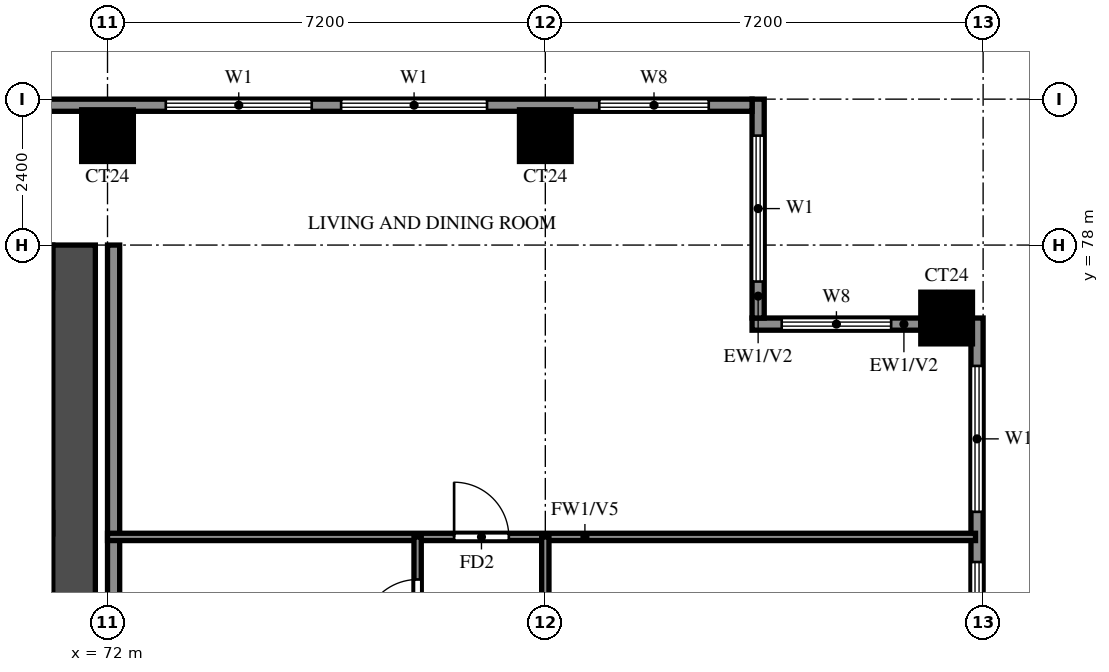
"""IFC4 building model, lengths in metres.
Left out: names, types, materials, properties, quantities, classifications, styles, units other than length and angle.
Written with IfcOpenShell. Run it as: python <this file> out.ifc"""

import sys

from ifc_helpers import new_model, si_unit, direction, frame, frame_2d, origin, origin_2d, place, context, subcontext, project, spatial, rectangle, extrude, source, transform, mapped, element, fill, save


model = new_model("IFC4")
c1 = context("Model", 3, precision=1e-05, world=origin(), true_north=direction((0.0, 1.0)))
c2 = subcontext(c1, "Body", "Model", "MODEL_VIEW")
j1 = project(units=[si_unit("LENGTHUNIT", "METRE"), si_unit("PLANEANGLEUNIT", "RADIAN")], contexts=[c1])
p1 = place(None, origin())
s1 = spatial("IfcSite", under=j1, at=p1, CompositionType="ELEMENT")
p2 = place(p1, origin())
s2 = spatial("IfcBuilding", under=s1, at=p2, CompositionType="ELEMENT")
p3 = place(p2, frame((0.0, 0.0, 150.0)))
s3 = spatial("IfcBuildingStorey", under=s2, at=p3, CompositionType="ELEMENT", Elevation=150.0)
m1 = source(origin(), c2, "Body", "SweptSolid", [
    extrude(rectangle(XDim=0.85, YDim=0.85, at=origin_2d()), origin(), (0.0, 0.0, 1.0), 3.2),
])
for number, where, z_axis, x_axis in (
    (1, (85.8, 76.8, 0.0), (0.0, 0.0, 1.0), (1.0, 0.0, 0.0)),
    (2, (72.0, 79.8, 0.0), (0.0, 0.0, 1.0), (1.0, 0.0, 0.0)),
    (3, (79.2, 79.8, 0.0), (0.0, 0.0, 1.0), (1.0, 0.0, 0.0)),
):
    element("IfcColumn", number, at=place(p3, frame(where, z_axis=z_axis, x_axis=x_axis)), inside=s3, PredefinedType="COLUMN", context=c2, shape_type="MappedRepresentation", body=[
        mapped(m1, transform((0.0, 0.0, 0.0))),
    ])
p4 = place(p3, frame((71.45, 66.1, 0.0), z_axis=(0.0, 0.0, 1.0), x_axis=(0.0, 1.0, 0.0)))
e4 = element("IfcWall", 4, at=p4, inside=s3, PredefinedType="SHEAR", context=c2, shape_type="SweptSolid", body=[
    extrude(rectangle(XDim=11.9, YDim=0.7, at=frame_2d((5.95, 0.0))), origin(), (0.0, 0.0, 1.0), 3.2),
])
p5 = place(p3, frame((29.7, 77.65, 0.0), z_axis=(0.0, 0.0, 1.0), x_axis=(1.0, 0.0, 0.0)))
e5 = element("IfcWall", 5, at=p5, inside=s3, PredefinedType="SHEAR", context=c2, shape_type="SweptSolid", body=[
    extrude(rectangle(XDim=41.4, YDim=0.7, at=frame_2d((20.7, 0.0))), origin(), (0.0, 0.0, 1.0), 3.2),
])
p6 = place(p3, frame((86.3, 48.2, 0.0), z_axis=(0.0, 0.0, 1.0), x_axis=(0.0, 1.0, 0.0)))
e6 = element("IfcWall", 6, at=p6, inside=s3, PredefinedType="SOLIDWALL", context=c2, shape_type="SweptSolid", body=[
    extrude(rectangle(XDim=28.6, YDim=0.2, at=frame_2d((14.3, 0.0))), origin(), (0.0, 0.0, 1.0), 3.2),
])
p7 = place(p6, frame((11.5, 0.0, 0.0)))
e7 = element("IfcOpeningElement", 7, at=p7, cuts=e6, PredefinedType="OPENING", context=c2, shape_type="SweptSolid", body=[
    extrude(rectangle(XDim=1.8, YDim=2.4, at=frame_2d((0.9, 1.2))), frame((0.0, 0.11, 0.0), z_axis=(0.0, -1.0, 0.0), x_axis=(1.0, 0.0, 0.0)), (0.0, 0.0, 1.0), 0.22),
])
p8 = place(p6, frame((0.6, 0.0, 0.6)))
e8 = element("IfcOpeningElement", 8, at=p8, cuts=e6, PredefinedType="OPENING", context=c2, shape_type="SweptSolid", body=[
    extrude(rectangle(XDim=2.4, YDim=2.4, at=frame_2d((1.2, 1.2))), frame((0.0, 0.11, 0.0), z_axis=(0.0, -1.0, 0.0), x_axis=(1.0, 0.0, 0.0)), (0.0, 0.0, 1.0), 0.22),
])
p9 = place(p6, frame((3.812, 0.0, 0.6)))
e9 = element("IfcOpeningElement", 9, at=p9, cuts=e6, PredefinedType="OPENING", context=c2, shape_type="SweptSolid", body=[
    extrude(rectangle(XDim=2.4, YDim=2.4, at=frame_2d((1.2, 1.2))), frame((0.0, 0.11, 0.0), z_axis=(0.0, -1.0, 0.0), x_axis=(1.0, 0.0, 0.0)), (0.0, 0.0, 1.0), 0.22),
])
p10 = place(p6, frame((7.488, 0.0, 0.6)))
e10 = element("IfcOpeningElement", 10, at=p10, cuts=e6, PredefinedType="OPENING", context=c2, shape_type="SweptSolid", body=[
    extrude(rectangle(XDim=1.8, YDim=2.4, at=frame_2d((0.9, 1.2))), frame((0.0, 0.11, 0.0), z_axis=(0.0, -1.0, 0.0), x_axis=(1.0, 0.0, 0.0)), (0.0, 0.0, 1.0), 0.22),
])
p11 = place(p6, frame((14.837, 0.0, 1.5)))
e11 = element("IfcOpeningElement", 11, at=p11, cuts=e6, PredefinedType="OPENING", context=c2, shape_type="SweptSolid", body=[
    extrude(rectangle(XDim=0.9, YDim=0.9, at=frame_2d((0.45, 0.45))), frame((0.0, 0.11, 0.0), z_axis=(0.0, -1.0, 0.0), x_axis=(1.0, 0.0, 0.0)), (0.0, 0.0, 1.0), 0.22),
])
p12 = place(p6, frame((16.75, 0.0, 1.5)))
e12 = element("IfcOpeningElement", 12, at=p12, cuts=e6, PredefinedType="OPENING", context=c2, shape_type="SweptSolid", body=[
    extrude(rectangle(XDim=0.9, YDim=0.9, at=frame_2d((0.45, 0.45))), frame((0.0, 0.11, 0.0), z_axis=(0.0, -1.0, 0.0), x_axis=(1.0, 0.0, 0.0)), (0.0, 0.0, 1.0), 0.22),
])
p13 = place(p6, frame((18.212, 0.0, 0.6)))
e13 = element("IfcOpeningElement", 13, at=p13, cuts=e6, PredefinedType="OPENING", context=c2, shape_type="SweptSolid", body=[
    extrude(rectangle(XDim=2.4, YDim=2.4, at=frame_2d((1.2, 1.2))), frame((0.0, 0.11, 0.0), z_axis=(0.0, -1.0, 0.0), x_axis=(1.0, 0.0, 0.0)), (0.0, 0.0, 1.0), 0.22),
])
p14 = place(p6, frame((22.188, 0.0, 0.6)))
e14 = element("IfcOpeningElement", 14, at=p14, cuts=e6, PredefinedType="OPENING", context=c2, shape_type="SweptSolid", body=[
    extrude(rectangle(XDim=2.4, YDim=2.4, at=frame_2d((1.2, 1.2))), frame((0.0, 0.11, 0.0), z_axis=(0.0, -1.0, 0.0), x_axis=(1.0, 0.0, 0.0)), (0.0, 0.0, 1.0), 0.22),
])
p15 = place(p6, frame((25.413, 0.0, 0.6)))
e15 = element("IfcOpeningElement", 15, at=p15, cuts=e6, PredefinedType="OPENING", context=c2, shape_type="SweptSolid", body=[
    extrude(rectangle(XDim=2.4, YDim=2.4, at=frame_2d((1.2, 1.2))), frame((0.0, 0.11, 0.0), z_axis=(0.0, -1.0, 0.0), x_axis=(1.0, 0.0, 0.0)), (0.0, 0.0, 1.0), 0.22),
])
p16 = place(p3, frame((85.375, 76.7, 0.0), z_axis=(0.0, 0.0, 1.0), x_axis=(-1.0, 0.0, 0.0)))
e16 = element("IfcWall", 16, at=p16, inside=s3, PredefinedType="SOLIDWALL", context=c2, shape_type="SweptSolid", body=[
    extrude(rectangle(XDim=2.775, YDim=0.2, at=frame_2d((1.387, 0.0))), origin(), (0.0, 0.0, 1.0), 3.2),
])
p17 = place(p16, frame((0.488, 0.0, 0.6)))
e17 = element("IfcOpeningElement", 17, at=p17, cuts=e16, PredefinedType="OPENING", context=c2, shape_type="SweptSolid", body=[
    extrude(rectangle(XDim=1.8, YDim=2.4, at=frame_2d((0.9, 1.2))), frame((0.0, 0.11, 0.0), z_axis=(0.0, -1.0, 0.0), x_axis=(1.0, 0.0, 0.0)), (0.0, 0.0, 1.0), 0.22),
])
p18 = place(p3, frame((82.7, 76.8, 0.0), z_axis=(0.0, 0.0, 1.0), x_axis=(0.0, 1.0, 0.0)))
e18 = element("IfcWall", 18, at=p18, inside=s3, PredefinedType="SOLIDWALL", context=c2, shape_type="SweptSolid", body=[
    extrude(rectangle(XDim=3.6, YDim=0.2, at=frame_2d((1.8, 0.0))), origin(), (0.0, 0.0, 1.0), 3.2),
])
p19 = place(p18, frame((0.6, 0.0, 0.6)))
e19 = element("IfcOpeningElement", 19, at=p19, cuts=e18, PredefinedType="OPENING", context=c2, shape_type="SweptSolid", body=[
    extrude(rectangle(XDim=2.4, YDim=2.4, at=frame_2d((1.2, 1.2))), frame((0.0, 0.11, 0.0), z_axis=(0.0, -1.0, 0.0), x_axis=(1.0, 0.0, 0.0)), (0.0, 0.0, 1.0), 0.22),
])
p20 = place(p3, frame((82.6, 80.3, 0.0), z_axis=(0.0, 0.0, 1.0), x_axis=(-1.0, 0.0, 0.0)))
e20 = element("IfcWall", 20, at=p20, inside=s3, PredefinedType="SOLIDWALL", context=c2, shape_type="SweptSolid", body=[
    extrude(rectangle(XDim=53.8, YDim=0.2, at=frame_2d((26.9, 0.0))), origin(), (0.0, 0.0, 1.0), 3.2),
])
p21 = place(p20, frame((0.712, 0.0, 0.6)))
e21 = element("IfcOpeningElement", 21, at=p21, cuts=e20, PredefinedType="OPENING", context=c2, shape_type="SweptSolid", body=[
    extrude(rectangle(XDim=1.8, YDim=2.4, at=frame_2d((0.9, 1.2))), frame((0.0, 0.11, 0.0), z_axis=(0.0, -1.0, 0.0), x_axis=(1.0, 0.0, 0.0)), (0.0, 0.0, 1.0), 0.22),
])
p22 = place(p20, frame((4.358, 0.0, 0.6)))
e22 = element("IfcOpeningElement", 22, at=p22, cuts=e20, PredefinedType="OPENING", context=c2, shape_type="SweptSolid", body=[
    extrude(rectangle(XDim=2.4, YDim=2.4, at=frame_2d((1.2, 1.2))), frame((0.0, 0.11, 0.0), z_axis=(0.0, -1.0, 0.0), x_axis=(1.0, 0.0, 0.0)), (0.0, 0.0, 1.0), 0.22),
])
p23 = place(p20, frame((7.242, 0.0, 0.6)))
e23 = element("IfcOpeningElement", 23, at=p23, cuts=e20, PredefinedType="OPENING", context=c2, shape_type="SweptSolid", body=[
    extrude(rectangle(XDim=2.4, YDim=2.4, at=frame_2d((1.2, 1.2))), frame((0.0, 0.11, 0.0), z_axis=(0.0, -1.0, 0.0), x_axis=(1.0, 0.0, 0.0)), (0.0, 0.0, 1.0), 0.22),
])
p24 = place(p3, frame((72.1, 62.4, 0.0), z_axis=(0.0, 0.0, 1.0), x_axis=(0.0, 1.0, 0.0)))
e24 = element("IfcWall", 24, at=p24, inside=s3, PredefinedType="SOLIDWALL", context=c2, shape_type="SweptSolid", body=[
    extrude(rectangle(XDim=15.6, YDim=0.2, at=frame_2d((7.8, 0.0))), origin(), (0.0, 0.0, 1.0), 3.2),
])
p25 = place(p3, frame((72.0, 73.2, 0.0), z_axis=(0.0, 0.0, 1.0), x_axis=(1.0, 0.0, 0.0)))
e25 = element("IfcWall", 25, at=p25, inside=s3, PredefinedType="PARTITIONING", context=c2, shape_type="SweptSolid", body=[
    extrude(rectangle(XDim=14.275, YDim=0.12, at=frame_2d((7.137, 0.0))), origin(), (0.0, 0.0, 1.0), 2.3),
])
p26 = place(p25, frame((5.7, 0.0, 0.0)))
e26 = element("IfcOpeningElement", 26, at=p26, cuts=e25, PredefinedType="OPENING", context=c2, shape_type="SweptSolid", body=[
    extrude(rectangle(XDim=0.9, YDim=2.1, at=frame_2d((0.45, 1.05))), frame((0.0, 0.07, 0.0), z_axis=(0.0, -1.0, 0.0), x_axis=(1.0, 0.0, 0.0)), (0.0, 0.0, 1.0), 0.14),
])
p27 = place(p3, frame((77.1, 61.2, 0.0), z_axis=(0.0, 0.0, 1.0), x_axis=(0.0, 1.0, 0.0)))
e27 = element("IfcWall", 27, at=p27, inside=s3, PredefinedType="PARTITIONING", context=c2, shape_type="SweptSolid", body=[
    extrude(rectangle(XDim=12.0, YDim=0.12, at=frame_2d((6.0, 0.0))), origin(), (0.0, 0.0, 1.0), 3.2),
])
p28 = place(p27, frame((5.45, 0.0, 0.0)))
e28 = element("IfcOpeningElement", 28, at=p28, cuts=e27, PredefinedType="OPENING", context=c2, shape_type="SweptSolid", body=[
    extrude(rectangle(XDim=0.8, YDim=2.1, at=frame_2d((0.4, 1.05))), frame((0.0, 0.07, 0.0), z_axis=(0.0, -1.0, 0.0), x_axis=(1.0, 0.0, 0.0)), (0.0, 0.0, 1.0), 0.14),
])
p29 = place(p27, frame((7.975, 0.0, 0.0)))
e29 = element("IfcOpeningElement", 29, at=p29, cuts=e27, PredefinedType="OPENING", context=c2, shape_type="SweptSolid", body=[
    extrude(rectangle(XDim=0.8, YDim=2.1, at=frame_2d((0.4, 1.05))), frame((0.0, 0.07, 0.0), z_axis=(0.0, -1.0, 0.0), x_axis=(1.0, 0.0, 0.0)), (0.0, 0.0, 1.0), 0.14),
])
p30 = place(p27, frame((10.4, 0.0, 0.0)))
e30 = element("IfcOpeningElement", 30, at=p30, cuts=e27, PredefinedType="OPENING", context=c2, shape_type="SweptSolid", body=[
    extrude(rectangle(XDim=0.9, YDim=2.1, at=frame_2d((0.45, 1.05))), frame((0.0, 0.07, 0.0), z_axis=(0.0, -1.0, 0.0), x_axis=(1.0, 0.0, 0.0)), (0.0, 0.0, 1.0), 0.14),
])
p31 = place(p3, frame((79.2, 66.0, 0.0), z_axis=(0.0, 0.0, 1.0), x_axis=(0.0, 1.0, 0.0)))
e31 = element("IfcWall", 31, at=p31, inside=s3, PredefinedType="PARTITIONING", context=c2, shape_type="SweptSolid", body=[
    extrude(rectangle(XDim=7.2, YDim=0.12, at=frame_2d((3.6, 0.0))), origin(), (0.0, 0.0, 1.0), 3.2),
])
p32 = place(p31, frame((1.35, 0.0, 0.0)))
e32 = element("IfcOpeningElement", 32, at=p32, cuts=e31, PredefinedType="OPENING", context=c2, shape_type="SweptSolid", body=[
    extrude(rectangle(XDim=0.9, YDim=2.1, at=frame_2d((0.45, 1.05))), frame((0.0, 0.07, 0.0), z_axis=(0.0, -1.0, 0.0), x_axis=(1.0, 0.0, 0.0)), (0.0, 0.0, 1.0), 0.14),
])
p33 = place(p31, frame((4.95, 0.0, 0.0)))
e33 = element("IfcOpeningElement", 33, at=p33, cuts=e31, PredefinedType="OPENING", context=c2, shape_type="SweptSolid", body=[
    extrude(rectangle(XDim=0.9, YDim=2.1, at=frame_2d((0.45, 1.05))), frame((0.0, 0.07, 0.0), z_axis=(0.0, -1.0, 0.0), x_axis=(1.0, 0.0, 0.0)), (0.0, 0.0, 1.0), 0.14),
])
p34 = place(p14, origin())
e34 = element("IfcWindow", 34, at=p34, inside=s3, PartitioningType="DOUBLE_PANEL_VERTICAL", PredefinedType="WINDOW", context=c2, shape_type="SweptSolid", body=[
    extrude(rectangle(XDim=2.4, YDim=2.4, at=frame_2d((1.2, 1.2))), frame((0.0, 0.03, 0.0), z_axis=(0.0, -1.0, 0.0), x_axis=(1.0, 0.0, 0.0)), (0.0, 0.0, 1.0), 0.06),
])
fill(e14, e34)
p35 = place(p15, origin())
e35 = element("IfcWindow", 35, at=p35, inside=s3, PartitioningType="DOUBLE_PANEL_VERTICAL", PredefinedType="WINDOW", context=c2, shape_type="SweptSolid", body=[
    extrude(rectangle(XDim=2.4, YDim=2.4, at=frame_2d((1.2, 1.2))), frame((0.0, 0.03, 0.0), z_axis=(0.0, -1.0, 0.0), x_axis=(1.0, 0.0, 0.0)), (0.0, 0.0, 1.0), 0.06),
])
fill(e15, e35)
p36 = place(p17, origin())
e36 = element("IfcWindow", 36, at=p36, inside=s3, PartitioningType="DOUBLE_PANEL_VERTICAL", PredefinedType="WINDOW", context=c2, shape_type="SweptSolid", body=[
    extrude(rectangle(XDim=1.8, YDim=2.4, at=frame_2d((0.9, 1.2))), frame((0.0, 0.03, 0.0), z_axis=(0.0, -1.0, 0.0), x_axis=(1.0, 0.0, 0.0)), (0.0, 0.0, 1.0), 0.06),
])
fill(e17, e36)
p37 = place(p19, origin())
e37 = element("IfcWindow", 37, at=p37, inside=s3, PartitioningType="DOUBLE_PANEL_VERTICAL", PredefinedType="WINDOW", context=c2, shape_type="SweptSolid", body=[
    extrude(rectangle(XDim=2.4, YDim=2.4, at=frame_2d((1.2, 1.2))), frame((0.0, 0.03, 0.0), z_axis=(0.0, -1.0, 0.0), x_axis=(1.0, 0.0, 0.0)), (0.0, 0.0, 1.0), 0.06),
])
fill(e19, e37)
p38 = place(p21, origin())
e38 = element("IfcWindow", 38, at=p38, inside=s3, PartitioningType="DOUBLE_PANEL_VERTICAL", PredefinedType="WINDOW", context=c2, shape_type="SweptSolid", body=[
    extrude(rectangle(XDim=1.8, YDim=2.4, at=frame_2d((0.9, 1.2))), frame((0.0, 0.03, 0.0), z_axis=(0.0, -1.0, 0.0), x_axis=(1.0, 0.0, 0.0)), (0.0, 0.0, 1.0), 0.06),
])
fill(e21, e38)
p39 = place(p22, origin())
e39 = element("IfcWindow", 39, at=p39, inside=s3, PartitioningType="DOUBLE_PANEL_VERTICAL", PredefinedType="WINDOW", context=c2, shape_type="SweptSolid", body=[
    extrude(rectangle(XDim=2.4, YDim=2.4, at=frame_2d((1.2, 1.2))), frame((0.0, 0.03, 0.0), z_axis=(0.0, -1.0, 0.0), x_axis=(1.0, 0.0, 0.0)), (0.0, 0.0, 1.0), 0.06),
])
fill(e22, e39)
p40 = place(p23, origin())
e40 = element("IfcWindow", 40, at=p40, inside=s3, PartitioningType="DOUBLE_PANEL_VERTICAL", PredefinedType="WINDOW", context=c2, shape_type="SweptSolid", body=[
    extrude(rectangle(XDim=2.4, YDim=2.4, at=frame_2d((1.2, 1.2))), frame((0.0, 0.03, 0.0), z_axis=(0.0, -1.0, 0.0), x_axis=(1.0, 0.0, 0.0)), (0.0, 0.0, 1.0), 0.06),
])
fill(e23, e40)
p41 = place(p26, origin())
e41 = element("IfcDoor", 41, at=p41, inside=s3, OperationType="SINGLE_SWING_LEFT", PredefinedType="DOOR", context=c2, shape_type="SweptSolid", body=[
    extrude(rectangle(XDim=0.9, YDim=2.1, at=frame_2d((0.45, 1.05))), frame((0.0, 0.025, 0.0), z_axis=(0.0, -1.0, 0.0), x_axis=(1.0, 0.0, 0.0)), (0.0, 0.0, 1.0), 0.05),
])
fill(e26, e41)
p42 = place(p30, origin())
e42 = element("IfcDoor", 42, at=p42, inside=s3, OperationType="SINGLE_SWING_RIGHT", PredefinedType="DOOR", context=c2, shape_type="SweptSolid", body=[
    extrude(rectangle(XDim=0.9, YDim=2.1, at=frame_2d((0.45, 1.05))), frame((0.0, 0.025, 0.0), z_axis=(0.0, -1.0, 0.0), x_axis=(1.0, 0.0, 0.0)), (0.0, 0.0, 1.0), 0.05),
])
fill(e30, e42)
save(model, sys.argv[1])
